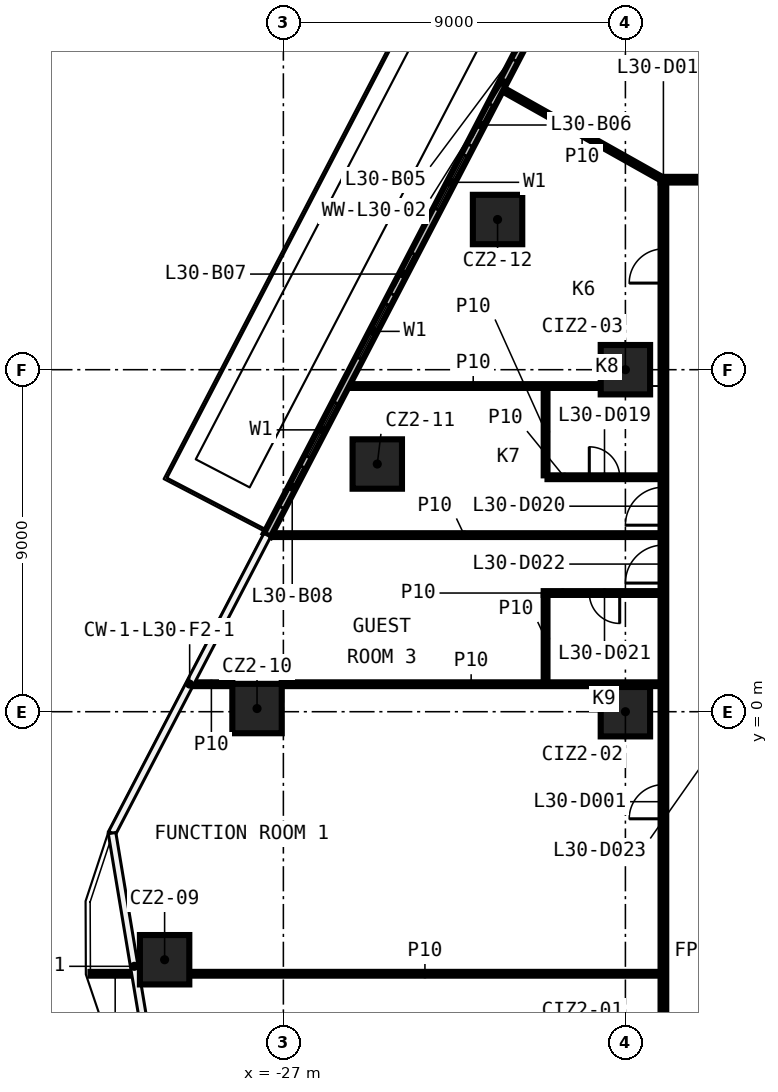
"""IFC4 building model, lengths in metres.
Left out: names, types, materials, properties, quantities, classifications, styles, units other than length and angle.
Written with IfcOpenShell. Run it as: python <this file> out.ifc"""

import sys

from ifc_helpers import new_model, si_unit, direction, frame, frame_2d, origin, origin_2d, place, context, subcontext, project, spatial, rectangle, extrude, element, fill, save


model = new_model("IFC4")
c1 = context("Model", 3, precision=1e-05, world=origin(), true_north=direction((0.0, 1.0)))
c2 = subcontext(c1, "Body", "Model", "MODEL_VIEW")
j1 = project(units=[si_unit("LENGTHUNIT", "METRE"), si_unit("PLANEANGLEUNIT", "RADIAN")], contexts=[c1])
p1 = place(None, origin())
s1 = spatial("IfcSite", under=j1, at=p1, CompositionType="ELEMENT")
p2 = place(p1, origin())
s2 = spatial("IfcBuilding", under=s1, at=p2, CompositionType="ELEMENT")
p3 = place(p2, frame((0.0, 0.0, 135.9)))
s3 = spatial("IfcBuildingStorey", under=s2, at=p3, CompositionType="ELEMENT", Elevation=135.9)
for number, where, z_axis, x_axis in (
    (1, (-30.125, -6.527, 0.0), (0.0, 0.0, 1.0), (1.0, 0.0, 0.0)),
    (2, (-27.693, 0.083, 0.0), (0.0, 0.0, 1.0), (1.0, 0.0, 0.0)),
    (3, (-24.529, 6.518, 0.0), (0.0, 0.0, 1.0), (1.0, 0.0, 0.0)),
    (4, (-21.364, 12.952, 0.0), (0.0, 0.0, 1.0), (1.0, 0.0, 0.0)),
    (5, (-18.0, 0.0, 0.0), (0.0, 0.0, 1.0), (1.0, 0.0, 0.0)),
    (6, (-18.0, 9.0, 0.0), (0.0, 0.0, 1.0), (1.0, 0.0, 0.0)),
):
    element("IfcColumn", number, at=place(p3, frame(where, z_axis=z_axis, x_axis=x_axis)), inside=s3, PredefinedType="COLUMN", context=c2, shape_type="SweptSolid", body=[
        extrude(rectangle(XDim=1.3, YDim=1.3, at=origin_2d()), origin(), (0.0, 0.0, 1.0), 3.3),
    ])
p4 = place(p3, frame((-32.076, -6.896, 0.0), z_axis=(0.0, 0.0, 1.0), x_axis=(1.0, 0.0, 0.0)))
e7 = element("IfcWall", 7, at=p4, inside=s3, PredefinedType="PARTITIONING", context=c2, shape_type="SweptSolid", body=[
    extrude(rectangle(XDim=1.301, YDim=0.1, at=frame_2d((0.651, 0.0))), origin(), (0.0, 0.0, 1.0), 3.3),
])
p5 = place(p3, frame((-29.475, -6.896, 0.0), z_axis=(0.0, 0.0, 1.0), x_axis=(1.0, 0.0, 0.0)))
e8 = element("IfcWall", 8, at=p5, inside=s3, PredefinedType="PARTITIONING", context=c2, shape_type="SweptSolid", body=[
    extrude(rectangle(XDim=12.4, YDim=0.1, at=frame_2d((6.2, 0.0))), origin(), (0.0, 0.0, 1.0), 3.3),
])
p6 = place(p3, frame((-29.446, 0.723, 0.0), z_axis=(0.0, 0.0, 1.0), x_axis=(1.0, 0.0, 0.0)))
e9 = element("IfcWall", 9, at=p6, inside=s3, PredefinedType="PARTITIONING", context=c2, shape_type="SweptSolid", body=[
    extrude(rectangle(XDim=1.103, YDim=0.1, at=frame_2d((0.551, 0.0))), origin(), (0.0, 0.0, 1.0), 3.3),
])
p7 = place(p3, frame((-27.043, 0.723, 0.0), z_axis=(0.0, 0.0, 1.0), x_axis=(1.0, 0.0, 0.0)))
e10 = element("IfcWall", 10, at=p7, inside=s3, PredefinedType="PARTITIONING", context=c2, shape_type="SweptSolid", body=[
    extrude(rectangle(XDim=9.968, YDim=0.1, at=frame_2d((4.984, 0.0))), origin(), (0.0, 0.0, 1.0), 3.3),
])
p8 = place(p3, frame((-17.075, 3.123, 0.0), z_axis=(0.0, 0.0, 1.0), x_axis=(-1.0, 0.0, 0.0)))
e11 = element("IfcWall", 11, at=p8, inside=s3, PredefinedType="PARTITIONING", context=c2, shape_type="SweptSolid", body=[
    extrude(rectangle(XDim=3.075, YDim=0.1, at=frame_2d((1.538, 0.0))), origin(), (0.0, 0.0, 1.0), 3.3),
])
p9 = place(p8, frame((1.075, 0.0, 0.0)))
e12 = element("IfcOpeningElement", 12, at=p9, cuts=e11, PredefinedType="OPENING", context=c2, shape_type="SweptSolid", body=[
    extrude(rectangle(XDim=0.8, YDim=2.1, at=frame_2d((0.4, 1.05))), frame((0.0, 0.06, 0.0), z_axis=(0.0, -1.0, 0.0), x_axis=(1.0, 0.0, 0.0)), (0.0, 0.0, 1.0), 0.12),
])
p10 = place(p3, frame((-27.402, 4.647, 0.0), z_axis=(0.0, 0.0, 1.0), x_axis=(1.0, 0.0, 0.0)))
e13 = element("IfcWall", 13, at=p10, inside=s3, PredefinedType="PARTITIONING", context=c2, shape_type="SweptSolid", body=[
    extrude(rectangle(XDim=10.327, YDim=0.1, at=frame_2d((5.164, 0.0))), origin(), (0.0, 0.0, 1.0), 3.3),
])
p11 = place(p3, frame((-20.05, 6.17, 0.0), z_axis=(0.0, 0.0, 1.0), x_axis=(1.0, 0.0, 0.0)))
e14 = element("IfcWall", 14, at=p11, inside=s3, PredefinedType="PARTITIONING", context=c2, shape_type="SweptSolid", body=[
    extrude(rectangle(XDim=2.975, YDim=0.1, at=frame_2d((1.488, 0.0))), origin(), (0.0, 0.0, 1.0), 3.3),
])
p12 = place(p11, frame((1.1, 0.0, 0.0)))
e15 = element("IfcOpeningElement", 15, at=p12, cuts=e14, PredefinedType="OPENING", context=c2, shape_type="SweptSolid", body=[
    extrude(rectangle(XDim=0.8, YDim=2.1, at=frame_2d((0.4, 1.05))), frame((0.0, 0.06, 0.0), z_axis=(0.0, -1.0, 0.0), x_axis=(1.0, 0.0, 0.0)), (0.0, 0.0, 1.0), 0.12),
])
p13 = place(p3, frame((-25.359, 8.57, 0.0), z_axis=(0.0, 0.0, 1.0), x_axis=(1.0, 0.0, 0.0)))
e16 = element("IfcWall", 16, at=p13, inside=s3, PredefinedType="PARTITIONING", context=c2, shape_type="SweptSolid", body=[
    extrude(rectangle(XDim=6.709, YDim=0.1, at=frame_2d((3.354, 0.0))), origin(), (0.0, 0.0, 1.0), 3.3),
])
p14 = place(p3, frame((-17.075, 14.0, 0.0), z_axis=(0.0, 0.0, 1.0), x_axis=(1.0, 0.0, 0.0)))
e17 = element("IfcWall", 17, at=p14, inside=s3, PredefinedType="PARTITIONING", context=c2, shape_type="SweptSolid", body=[
    extrude(rectangle(XDim=34.15, YDim=0.15, at=frame_2d((17.075, 0.0))), origin(), (0.0, 0.0, 1.0), 3.3),
])
p15 = place(p14, frame((10.954, 0.0, 0.0)))
e18 = element("IfcOpeningElement", 18, at=p15, cuts=e17, PredefinedType="OPENING", context=c2, shape_type="SweptSolid", body=[
    extrude(rectangle(XDim=0.9, YDim=2.1, at=frame_2d((0.45, 1.05))), frame((0.0, 0.085, 0.0), z_axis=(0.0, -1.0, 0.0), x_axis=(1.0, 0.0, 0.0)), (0.0, 0.0, 1.0), 0.17),
])
p16 = place(p14, frame((7.617, 0.0, 0.0)))
e19 = element("IfcOpeningElement", 19, at=p16, cuts=e17, PredefinedType="OPENING", context=c2, shape_type="SweptSolid", body=[
    extrude(rectangle(XDim=1.0, YDim=2.1, at=frame_2d((0.5, 1.05))), frame((0.0, 0.085, 0.0), z_axis=(0.0, -1.0, 0.0), x_axis=(1.0, 0.0, 0.0)), (0.0, 0.0, 1.0), 0.17),
])
p17 = place(p14, frame((2.425, 0.0, 0.0)))
e20 = element("IfcOpeningElement", 20, at=p17, cuts=e17, PredefinedType="OPENING", context=c2, shape_type="SweptSolid", body=[
    extrude(rectangle(XDim=0.9, YDim=2.1, at=frame_2d((0.45, 1.05))), frame((0.0, 0.085, 0.0), z_axis=(0.0, -1.0, 0.0), x_axis=(1.0, 0.0, 0.0)), (0.0, 0.0, 1.0), 0.17),
])
p18 = place(p3, frame((-17.0, -13.925, 0.0), z_axis=(0.0, 0.0, 1.0), x_axis=(0.0, 1.0, 0.0)))
e21 = element("IfcWall", 21, at=p18, inside=s3, PredefinedType="PARTITIONING", context=c2, shape_type="SweptSolid", body=[
    extrude(rectangle(XDim=27.85, YDim=0.15, at=frame_2d((13.925, 0.0))), origin(), (0.0, 0.0, 1.0), 3.3),
])
p19 = place(p18, frame((11.107, 0.0, 0.0)))
e22 = element("IfcOpeningElement", 22, at=p19, cuts=e21, PredefinedType="OPENING", context=c2, shape_type="SweptSolid", body=[
    extrude(rectangle(XDim=0.9, YDim=2.1, at=frame_2d((0.45, 1.05))), frame((0.0, 0.085, 0.0), z_axis=(0.0, -1.0, 0.0), x_axis=(1.0, 0.0, 0.0)), (0.0, 0.0, 1.0), 0.17),
])
p20 = place(p18, frame((25.204, 0.0, 0.0)))
e23 = element("IfcOpeningElement", 23, at=p20, cuts=e21, PredefinedType="OPENING", context=c2, shape_type="SweptSolid", body=[
    extrude(rectangle(XDim=0.9, YDim=2.1, at=frame_2d((0.45, 1.05))), frame((0.0, 0.085, 0.0), z_axis=(0.0, -1.0, 0.0), x_axis=(1.0, 0.0, 0.0)), (0.0, 0.0, 1.0), 0.17),
])
p21 = place(p18, frame((18.833, 0.0, 0.0)))
e24 = element("IfcOpeningElement", 24, at=p21, cuts=e21, PredefinedType="OPENING", context=c2, shape_type="SweptSolid", body=[
    extrude(rectangle(XDim=1.0, YDim=2.1, at=frame_2d((0.5, 1.05))), frame((0.0, 0.085, 0.0), z_axis=(0.0, -1.0, 0.0), x_axis=(1.0, 0.0, 0.0)), (0.0, 0.0, 1.0), 0.17),
])
p22 = place(p18, frame((17.31, 0.0, 0.0)))
e25 = element("IfcOpeningElement", 25, at=p22, cuts=e21, PredefinedType="OPENING", context=c2, shape_type="SweptSolid", body=[
    extrude(rectangle(XDim=1.0, YDim=2.1, at=frame_2d((0.5, 1.05))), frame((0.0, 0.085, 0.0), z_axis=(0.0, -1.0, 0.0), x_axis=(1.0, 0.0, 0.0)), (0.0, 0.0, 1.0), 0.17),
])
for number, where, z_axis, x_axis in (
    (26, (-20.1, 0.773, 0.0), (0.0, 0.0, 1.0), (0.0, 1.0, 0.0)),
    (27, (-20.1, 6.219, 0.0), (0.0, 0.0, 1.0), (0.0, 1.0, 0.0)),
):
    element("IfcWall", number, at=place(p3, frame(where, z_axis=z_axis, x_axis=x_axis)), inside=s3, PredefinedType="PARTITIONING", context=c2, shape_type="SweptSolid", body=[
        extrude(rectangle(XDim=2.3, YDim=0.1, at=frame_2d((1.15, 0.0))), origin(), (0.0, 0.0, 1.0), 3.3),
    ])
p23 = place(p3, frame((-21.279, 16.405, 0.0), z_axis=(0.0, 0.0, 1.0), x_axis=(0.871729599924, -0.489987249443, 0.0)))
e28 = element("IfcWall", 28, at=p23, inside=s3, PredefinedType="PARTITIONING", context=c2, shape_type="SweptSolid", body=[
    extrude(rectangle(XDim=4.908, YDim=0.1, at=frame_2d((2.454, 0.0))), origin(), (0.0, 0.0, 1.0), 3.3),
])
p24 = place(p3, frame((-17.21, 24.26, 0.0), z_axis=(0.0, 0.0, 1.0), x_axis=(-0.461902936619, -0.886930480445, 0.0)))
e29 = element("IfcWall", 29, at=p24, inside=s3, PredefinedType="SOLIDWALL", context=c2, shape_type="SweptSolid", body=[
    extrude(rectangle(XDim=22.113, YDim=0.2, at=frame_2d((11.057, 0.0))), origin(), (0.0, 0.0, 1.0), 3.3),
])
p25 = place(p24, frame((2.0, 0.0, 0.6)))
e30 = element("IfcOpeningElement", 30, at=p25, cuts=e29, PredefinedType="OPENING", context=c2, shape_type="SweptSolid", body=[
    extrude(rectangle(XDim=1.6, YDim=2.4, at=frame_2d((0.8, 1.2))), frame((0.0, 0.11, 0.0), z_axis=(0.0, -1.0, 0.0), x_axis=(1.0, 0.0, 0.0)), (0.0, 0.0, 1.0), 0.22),
])
p26 = place(p24, frame((0.5, 0.0, 0.0)))
e31 = element("IfcOpeningElement", 31, at=p26, cuts=e29, PredefinedType="OPENING", context=c2, shape_type="SweptSolid", body=[
    extrude(rectangle(XDim=1.2, YDim=2.4, at=frame_2d((0.6, 1.2))), frame((0.0, 0.11, 0.0), z_axis=(0.0, -1.0, 0.0), x_axis=(1.0, 0.0, 0.0)), (0.0, 0.0, 1.0), 0.22),
])
p27 = place(p24, frame((4.923, 0.0, 0.6)))
e32 = element("IfcOpeningElement", 32, at=p27, cuts=e29, PredefinedType="OPENING", context=c2, shape_type="SweptSolid", body=[
    extrude(rectangle(XDim=1.6, YDim=2.4, at=frame_2d((0.8, 1.2))), frame((0.0, 0.11, 0.0), z_axis=(0.0, -1.0, 0.0), x_axis=(1.0, 0.0, 0.0)), (0.0, 0.0, 1.0), 0.22),
])
p28 = place(p24, frame((6.823, 0.0, 0.0)))
e33 = element("IfcOpeningElement", 33, at=p28, cuts=e29, PredefinedType="OPENING", context=c2, shape_type="SweptSolid", body=[
    extrude(rectangle(XDim=1.2, YDim=2.4, at=frame_2d((0.6, 1.2))), frame((0.0, 0.11, 0.0), z_axis=(0.0, -1.0, 0.0), x_axis=(1.0, 0.0, 0.0)), (0.0, 0.0, 1.0), 0.22),
])
p29 = place(p24, frame((10.845, 0.0, 0.6)))
e34 = element("IfcOpeningElement", 34, at=p29, cuts=e29, PredefinedType="OPENING", context=c2, shape_type="SweptSolid", body=[
    extrude(rectangle(XDim=1.6, YDim=2.4, at=frame_2d((0.8, 1.2))), frame((0.0, 0.11, 0.0), z_axis=(0.0, -1.0, 0.0), x_axis=(1.0, 0.0, 0.0)), (0.0, 0.0, 1.0), 0.22),
])
p30 = place(p24, frame((9.345, 0.0, 0.0)))
e35 = element("IfcOpeningElement", 35, at=p30, cuts=e29, PredefinedType="OPENING", context=c2, shape_type="SweptSolid", body=[
    extrude(rectangle(XDim=1.2, YDim=2.4, at=frame_2d((0.6, 1.2))), frame((0.0, 0.11, 0.0), z_axis=(0.0, -1.0, 0.0), x_axis=(1.0, 0.0, 0.0)), (0.0, 0.0, 1.0), 0.22),
])
p31 = place(p24, frame((15.268, 0.0, 0.6)))
e36 = element("IfcOpeningElement", 36, at=p31, cuts=e29, PredefinedType="OPENING", context=c2, shape_type="SweptSolid", body=[
    extrude(rectangle(XDim=1.6, YDim=2.4, at=frame_2d((0.8, 1.2))), frame((0.0, 0.11, 0.0), z_axis=(0.0, -1.0, 0.0), x_axis=(1.0, 0.0, 0.0)), (0.0, 0.0, 1.0), 0.22),
])
p32 = place(p24, frame((13.768, 0.0, 0.0)))
e37 = element("IfcOpeningElement", 37, at=p32, cuts=e29, PredefinedType="OPENING", context=c2, shape_type="SweptSolid", body=[
    extrude(rectangle(XDim=1.2, YDim=2.4, at=frame_2d((0.6, 1.2))), frame((0.0, 0.11, 0.0), z_axis=(0.0, -1.0, 0.0), x_axis=(1.0, 0.0, 0.0)), (0.0, 0.0, 1.0), 0.22),
])
p33 = place(p24, frame((18.19, 0.0, 0.6)))
e38 = element("IfcOpeningElement", 38, at=p33, cuts=e29, PredefinedType="OPENING", context=c2, shape_type="SweptSolid", body=[
    extrude(rectangle(XDim=1.6, YDim=2.4, at=frame_2d((0.8, 1.2))), frame((0.0, 0.11, 0.0), z_axis=(0.0, -1.0, 0.0), x_axis=(1.0, 0.0, 0.0)), (0.0, 0.0, 1.0), 0.22),
])
p34 = place(p24, frame((20.09, 0.0, 0.0)))
e39 = element("IfcOpeningElement", 39, at=p34, cuts=e29, PredefinedType="OPENING", context=c2, shape_type="SweptSolid", body=[
    extrude(rectangle(XDim=1.2, YDim=2.4, at=frame_2d((0.6, 1.2))), frame((0.0, 0.11, 0.0), z_axis=(0.0, -1.0, 0.0), x_axis=(1.0, 0.0, 0.0)), (0.0, 0.0, 1.0), 0.22),
])
p35 = place(p19, origin())
e40 = element("IfcDoor", 40, at=p35, inside=s3, OperationType="SINGLE_SWING_RIGHT", PredefinedType="DOOR", context=c2, shape_type="SweptSolid", body=[
    extrude(rectangle(XDim=0.9, YDim=2.1, at=frame_2d((0.45, 1.05))), frame((0.0, 0.025, 0.0), z_axis=(0.0, -1.0, 0.0), x_axis=(1.0, 0.0, 0.0)), (0.0, 0.0, 1.0), 0.05),
])
fill(e22, e40)
p36 = place(p20, origin())
e41 = element("IfcDoor", 41, at=p36, inside=s3, OperationType="SINGLE_SWING_LEFT", PredefinedType="DOOR", context=c2, shape_type="SweptSolid", body=[
    extrude(rectangle(XDim=0.9, YDim=2.1, at=frame_2d((0.45, 1.05))), frame((0.0, 0.025, 0.0), z_axis=(0.0, -1.0, 0.0), x_axis=(1.0, 0.0, 0.0)), (0.0, 0.0, 1.0), 0.05),
])
fill(e23, e41)
p37 = place(p12, origin())
e42 = element("IfcDoor", 42, at=p37, inside=s3, OperationType="SINGLE_SWING_LEFT", PredefinedType="DOOR", context=c2, shape_type="SweptSolid", body=[
    extrude(rectangle(XDim=0.8, YDim=2.1, at=frame_2d((0.4, 1.05))), frame((0.0, 0.025, 0.0), z_axis=(0.0, -1.0, 0.0), x_axis=(1.0, 0.0, 0.0)), (0.0, 0.0, 1.0), 0.05),
])
fill(e15, e42)
p38 = place(p21, origin())
e43 = element("IfcDoor", 43, at=p38, inside=s3, OperationType="SINGLE_SWING_RIGHT", PredefinedType="DOOR", context=c2, shape_type="SweptSolid", body=[
    extrude(rectangle(XDim=1.0, YDim=2.1, at=frame_2d((0.5, 1.05))), frame((0.0, 0.025, 0.0), z_axis=(0.0, -1.0, 0.0), x_axis=(1.0, 0.0, 0.0)), (0.0, 0.0, 1.0), 0.05),
])
fill(e24, e43)
p39 = place(p9, origin())
e44 = element("IfcDoor", 44, at=p39, inside=s3, OperationType="SINGLE_SWING_RIGHT", PredefinedType="DOOR", context=c2, shape_type="SweptSolid", body=[
    extrude(rectangle(XDim=0.8, YDim=2.1, at=frame_2d((0.4, 1.05))), frame((0.0, 0.025, 0.0), z_axis=(0.0, -1.0, 0.0), x_axis=(1.0, 0.0, 0.0)), (0.0, 0.0, 1.0), 0.05),
])
fill(e12, e44)
p40 = place(p22, origin())
e45 = element("IfcDoor", 45, at=p40, inside=s3, OperationType="SINGLE_SWING_LEFT", PredefinedType="DOOR", context=c2, shape_type="SweptSolid", body=[
    extrude(rectangle(XDim=1.0, YDim=2.1, at=frame_2d((0.5, 1.05))), frame((0.0, 0.025, 0.0), z_axis=(0.0, -1.0, 0.0), x_axis=(1.0, 0.0, 0.0)), (0.0, 0.0, 1.0), 0.05),
])
fill(e25, e45)
p41 = place(p28, origin())
e46 = element("IfcDoor", 46, at=p41, inside=s3, OperationType="SLIDING_TO_LEFT", PredefinedType="DOOR", context=c2, shape_type="SweptSolid", body=[
    extrude(rectangle(XDim=1.2, YDim=2.4, at=frame_2d((0.6, 1.2))), frame((0.0, 0.025, 0.0), z_axis=(0.0, -1.0, 0.0), x_axis=(1.0, 0.0, 0.0)), (0.0, 0.0, 1.0), 0.05),
])
fill(e33, e46)
p42 = place(p29, origin())
e47 = element("IfcWindow", 47, at=p42, inside=s3, PartitioningType="SINGLE_PANEL", PredefinedType="WINDOW", context=c2, shape_type="SweptSolid", body=[
    extrude(rectangle(XDim=1.6, YDim=2.4, at=frame_2d((0.8, 1.2))), frame((0.0, 0.03, 0.0), z_axis=(0.0, -1.0, 0.0), x_axis=(1.0, 0.0, 0.0)), (0.0, 0.0, 1.0), 0.06),
])
fill(e34, e47)
p43 = place(p30, origin())
e48 = element("IfcDoor", 48, at=p43, inside=s3, OperationType="SLIDING_TO_LEFT", PredefinedType="DOOR", context=c2, shape_type="SweptSolid", body=[
    extrude(rectangle(XDim=1.2, YDim=2.4, at=frame_2d((0.6, 1.2))), frame((0.0, 0.025, 0.0), z_axis=(0.0, -1.0, 0.0), x_axis=(1.0, 0.0, 0.0)), (0.0, 0.0, 1.0), 0.05),
])
fill(e35, e48)
p44 = place(p31, origin())
e49 = element("IfcWindow", 49, at=p44, inside=s3, PartitioningType="SINGLE_PANEL", PredefinedType="WINDOW", context=c2, shape_type="SweptSolid", body=[
    extrude(rectangle(XDim=1.6, YDim=2.4, at=frame_2d((0.8, 1.2))), frame((0.0, 0.03, 0.0), z_axis=(0.0, -1.0, 0.0), x_axis=(1.0, 0.0, 0.0)), (0.0, 0.0, 1.0), 0.06),
])
fill(e36, e49)
p45 = place(p32, origin())
e50 = element("IfcDoor", 50, at=p45, inside=s3, OperationType="SLIDING_TO_LEFT", PredefinedType="DOOR", context=c2, shape_type="SweptSolid", body=[
    extrude(rectangle(XDim=1.2, YDim=2.4, at=frame_2d((0.6, 1.2))), frame((0.0, 0.025, 0.0), z_axis=(0.0, -1.0, 0.0), x_axis=(1.0, 0.0, 0.0)), (0.0, 0.0, 1.0), 0.05),
])
fill(e37, e50)
p46 = place(p33, origin())
e51 = element("IfcWindow", 51, at=p46, inside=s3, PartitioningType="SINGLE_PANEL", PredefinedType="WINDOW", context=c2, shape_type="SweptSolid", body=[
    extrude(rectangle(XDim=1.6, YDim=2.4, at=frame_2d((0.8, 1.2))), frame((0.0, 0.03, 0.0), z_axis=(0.0, -1.0, 0.0), x_axis=(1.0, 0.0, 0.0)), (0.0, 0.0, 1.0), 0.06),
])
fill(e38, e51)
p47 = place(p34, origin())
e52 = element("IfcDoor", 52, at=p47, inside=s3, OperationType="SLIDING_TO_LEFT", PredefinedType="DOOR", context=c2, shape_type="SweptSolid", body=[
    extrude(rectangle(XDim=1.2, YDim=2.4, at=frame_2d((0.6, 1.2))), frame((0.0, 0.025, 0.0), z_axis=(0.0, -1.0, 0.0), x_axis=(1.0, 0.0, 0.0)), (0.0, 0.0, 1.0), 0.05),
])
fill(e39, e52)
save(model, sys.argv[1])
